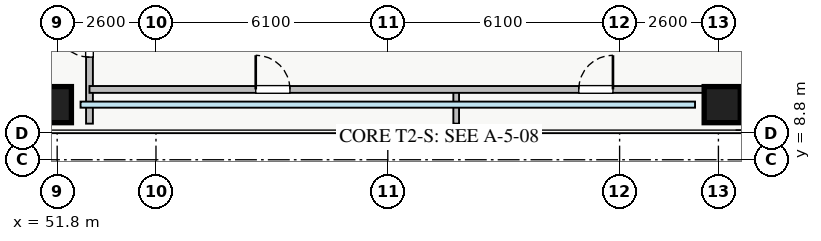
"""IFC4 building model, lengths in metres.
Left out: names, types, materials, properties, quantities, classifications, styles, units other than length and angle.
Written with IfcOpenShell. Run it as: python <this file> out.ifc"""

import sys

from ifc_helpers import new_model, si_unit, direction, frame, frame_2d, origin, origin_2d, place, context, subcontext, project, spatial, rectangle, extrude, source, transform, mapped, element, fill, save


model = new_model("IFC4")
c1 = context("Model", 3, precision=1e-05, world=origin(), true_north=direction((0.0, 1.0)))
c2 = subcontext(c1, "Body", "Model", "MODEL_VIEW")
j1 = project(units=[si_unit("LENGTHUNIT", "METRE"), si_unit("PLANEANGLEUNIT", "RADIAN")], contexts=[c1])
p1 = place(None, origin())
s1 = spatial("IfcSite", under=j1, at=p1, CompositionType="ELEMENT")
p2 = place(p1, origin())
s2 = spatial("IfcBuilding", under=s1, at=p2, CompositionType="ELEMENT")
p3 = place(p2, frame((0.0, 0.0, 63.25)))
s3 = spatial("IfcBuildingStorey", under=s2, at=p3, CompositionType="ELEMENT", Elevation=63.25)
m1 = source(origin(), c2, "Body", "SweptSolid", [
    extrude(rectangle(XDim=0.95, YDim=0.95, at=origin_2d()), origin(), (0.0, 0.0, 1.0), 3.25),
])
for number, where, z_axis, x_axis in (
    (1, (51.7, 10.25, 0.0), (0.0, 0.0, 1.0), (1.0, 0.0, 0.0)),
    (2, (69.3, 10.25, 0.0), (0.0, 0.0, 1.0), (1.0, 0.0, 0.0)),
):
    element("IfcColumn", number, at=place(p3, frame(where, z_axis=z_axis, x_axis=x_axis)), inside=s3, PredefinedType="COLUMN", context=c2, shape_type="MappedRepresentation", body=[
        mapped(m1, transform((0.0, 0.0, 0.0), x_axis=(1.0, 0.0, 0.0), y_axis=(0.0, 1.0, 0.0), z_axis=(0.0, 0.0, 1.0), scale=1.0)),
    ])
p4 = place(p3, frame((52.65, 9.75, 0.0), z_axis=(0.0, 0.0, 1.0), x_axis=(0.0, 1.0, 0.0)))
e3 = element("IfcWall", 3, at=p4, inside=s3, PredefinedType="PARTITIONING", context=c2, shape_type="SweptSolid", body=[
    extrude(rectangle(XDim=26.5, YDim=0.18, at=frame_2d((13.25, 0.0))), origin(), (0.0, 0.0, 1.0), 3.07),
])
p5 = place(p4, frame((23.85, 0.0, 0.0)))
e4 = element("IfcOpeningElement", 4, at=p5, cuts=e3, PredefinedType="OPENING", context=c2, shape_type="SweptSolid", body=[
    extrude(rectangle(XDim=0.9, YDim=2.05, at=frame_2d((0.45, 1.025))), frame((0.0, 0.1, 0.0), z_axis=(0.0, -1.0, 0.0), x_axis=(1.0, 0.0, 0.0)), (0.0, 0.0, 1.0), 0.2),
])
p6 = place(p4, frame((1.75, 0.0, 0.0)))
e5 = element("IfcOpeningElement", 5, at=p6, cuts=e3, PredefinedType="OPENING", context=c2, shape_type="SweptSolid", body=[
    extrude(rectangle(XDim=0.9, YDim=2.05, at=frame_2d((0.45, 1.025))), frame((0.0, 0.1, 0.0), z_axis=(0.0, -1.0, 0.0), x_axis=(1.0, 0.0, 0.0)), (0.0, 0.0, 1.0), 0.2),
])
p7 = place(p4, frame((5.355, 0.0, 0.0)))
e6 = element("IfcOpeningElement", 6, at=p7, cuts=e3, PredefinedType="OPENING", context=c2, shape_type="SweptSolid", body=[
    extrude(rectangle(XDim=1.0, YDim=2.05, at=frame_2d((0.5, 1.025))), frame((0.0, 0.1, 0.0), z_axis=(0.0, -1.0, 0.0), x_axis=(1.0, 0.0, 0.0)), (0.0, 0.0, 1.0), 0.2),
])
p8 = place(p4, frame((15.195, 0.0, 0.0)))
e7 = element("IfcOpeningElement", 7, at=p8, cuts=e3, PredefinedType="OPENING", context=c2, shape_type="SweptSolid", body=[
    extrude(rectangle(XDim=1.0, YDim=2.05, at=frame_2d((0.5, 1.025))), frame((0.0, 0.1, 0.0), z_axis=(0.0, -1.0, 0.0), x_axis=(1.0, 0.0, 0.0)), (0.0, 0.0, 1.0), 0.2),
])
for number, where, z_axis, x_axis in (
    (8, (62.3, 9.75, 0.0), (0.0, 0.0, 1.0), (0.0, 1.0, 0.0)),
    (9, (69.65, 9.75, 0.0), (0.0, 0.0, 1.0), (0.0, 1.0, 0.0)),
):
    element("IfcWall", number, at=place(p3, frame(where, z_axis=z_axis, x_axis=x_axis)), inside=s3, PredefinedType="PARTITIONING", context=c2, shape_type="SweptSolid", body=[
        extrude(rectangle(XDim=0.9, YDim=0.15, at=frame_2d((0.45, 0.0))), origin(), (0.0, 0.0, 1.0), 3.07),
    ])
p9 = place(p3, frame((52.65, 10.65, 0.0), z_axis=(0.0, 0.0, 1.0), x_axis=(1.0, 0.0, 0.0)))
e10 = element("IfcWall", 10, at=p9, inside=s3, PredefinedType="PARTITIONING", context=c2, shape_type="SweptSolid", body=[
    extrude(rectangle(XDim=17.0, YDim=0.18, at=frame_2d((8.5, 0.0))), origin(), (0.0, 0.0, 1.0), 3.07),
])
p10 = place(p9, frame((4.375, 0.0, 0.0)))
e11 = element("IfcOpeningElement", 11, at=p10, cuts=e10, PredefinedType="OPENING", context=c2, shape_type="SweptSolid", body=[
    extrude(rectangle(XDim=0.9, YDim=2.05, at=frame_2d((0.45, 1.025))), frame((0.0, 0.1, 0.0), z_axis=(0.0, -1.0, 0.0), x_axis=(1.0, 0.0, 0.0)), (0.0, 0.0, 1.0), 0.2),
])
p11 = place(p9, frame((12.875, 0.0, 0.0)))
e12 = element("IfcOpeningElement", 12, at=p11, cuts=e10, PredefinedType="OPENING", context=c2, shape_type="SweptSolid", body=[
    extrude(rectangle(XDim=0.9, YDim=2.05, at=frame_2d((0.45, 1.025))), frame((0.0, 0.1, 0.0), z_axis=(0.0, -1.0, 0.0), x_axis=(1.0, 0.0, 0.0)), (0.0, 0.0, 1.0), 0.2),
])
m2 = source(origin(), c2, "Body", "SweptSolid", [
    extrude(rectangle(XDim=0.9, YDim=2.05, at=frame_2d((0.45, 1.025))), frame((0.0, 0.025, 0.0), z_axis=(0.0, -1.0, 0.0), x_axis=(1.0, 0.0, 0.0)), (0.0, 0.0, 1.0), 0.05),
])
p12 = place(p6, origin())
e13 = element("IfcDoor", 13, at=p12, inside=s3, OperationType="SINGLE_SWING_RIGHT", PredefinedType="DOOR", context=c2, shape_type="MappedRepresentation", body=[
    mapped(m2, transform((0.0, 0.0, 0.0), x_axis=(1.0, 0.0, 0.0), y_axis=(0.0, 1.0, 0.0), z_axis=(0.0, 0.0, 1.0), scale=1.0)),
])
fill(e5, e13)
p13 = place(p10, origin())
e14 = element("IfcDoor", 14, at=p13, inside=s3, OperationType="SINGLE_SWING_LEFT", PredefinedType="DOOR", context=c2, shape_type="MappedRepresentation", body=[
    mapped(m2, transform((0.0, 0.0, 0.0), x_axis=(1.0, 0.0, 0.0), y_axis=(0.0, 1.0, 0.0), z_axis=(0.0, 0.0, 1.0), scale=1.0)),
])
fill(e11, e14)
p14 = place(p11, origin())
e15 = element("IfcDoor", 15, at=p14, inside=s3, OperationType="SINGLE_SWING_RIGHT", PredefinedType="DOOR", context=c2, shape_type="MappedRepresentation", body=[
    mapped(m2, transform((0.0, 0.0, 0.0), x_axis=(1.0, 0.0, 0.0), y_axis=(0.0, 1.0, 0.0), z_axis=(0.0, 0.0, 1.0), scale=1.0)),
])
fill(e12, e15)
save(model, sys.argv[1])
